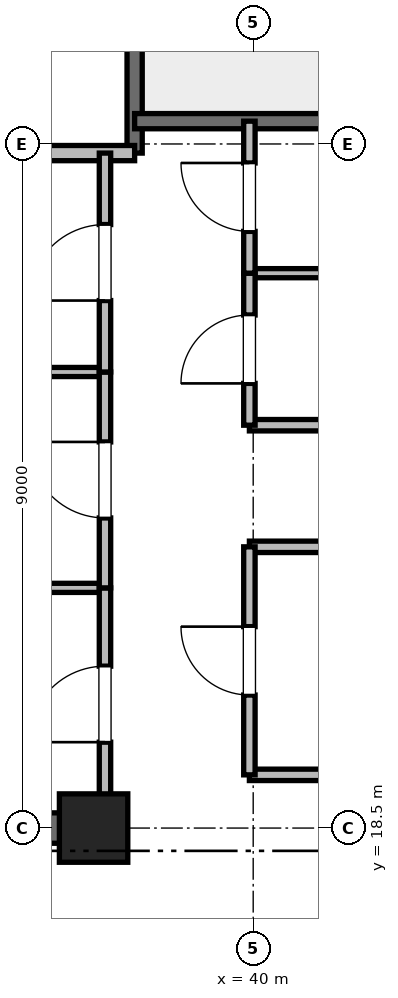
"""IFC4 building model, lengths in metres.
Left out: names, types, materials, properties, quantities, classifications, styles, units other than length and angle.
Written with IfcOpenShell. Run it as: python <this file> out.ifc"""

import sys

from ifc_helpers import new_model, si_unit, direction, frame, frame_2d, origin, origin_2d, place, context, subcontext, project, spatial, rectangle, extrude, element, fill, save


model = new_model("IFC4")
c1 = context("Model", 3, precision=1e-05, world=origin(), true_north=direction((0.0, 1.0)))
c2 = subcontext(c1, "Body", "Model", "MODEL_VIEW")
j1 = project(units=[si_unit("LENGTHUNIT", "METRE"), si_unit("PLANEANGLEUNIT", "RADIAN")], contexts=[c1])
p1 = place(None, origin())
s1 = spatial("IfcSite", under=j1, at=p1, CompositionType="ELEMENT")
p2 = place(p1, origin())
s2 = spatial("IfcBuilding", under=s1, at=p2, CompositionType="ELEMENT")
p3 = place(p2, frame((0.0, 0.0, 330.8)))
s3 = spatial("IfcBuildingStorey", under=s2, at=p3, CompositionType="ELEMENT", Elevation=330.8)
p4 = place(p3, frame((37.9, 18.5, 0.0), z_axis=(0.0, 0.0, 1.0), x_axis=(1.0, 0.0, 0.0)))
e1 = element("IfcColumn", 1, at=p4, inside=s3, PredefinedType="PILASTER", context=c2, shape_type="SweptSolid", body=[
    extrude(rectangle(XDim=0.9, YDim=0.9, at=origin_2d()), origin(), (0.0, 0.0, 1.0), 4.0),
])
p5 = place(p3, frame((29.0, 18.5, 0.0), z_axis=(0.0, 0.0, 1.0), x_axis=(1.0, 0.0, 0.0)))
e2 = element("IfcWall", 2, at=p5, inside=s3, PredefinedType="SHEAR", context=c2, shape_type="SweptSolid", body=[
    extrude(rectangle(XDim=9.2, YDim=0.4, at=frame_2d((4.6, 0.0))), origin(), (0.0, 0.0, 1.0), 3.785),
])
p6 = place(p3, frame((38.44, 27.38, 0.0), z_axis=(0.0, 0.0, 1.0), x_axis=(0.0, 1.0, 0.0)))
e3 = element("IfcWall", 3, at=p6, inside=s3, PredefinedType="SOLIDWALL", context=c2, shape_type="SweptSolid", body=[
    extrude(rectangle(XDim=8.87, YDim=0.2, at=frame_2d((4.435, 0.0))), origin(), (0.0, 0.0, 1.0), 3.785),
])
p7 = place(p3, frame((38.44, 27.8, 0.0), z_axis=(0.0, 0.0, 1.0), x_axis=(1.0, 0.0, 0.0)))
e4 = element("IfcWall", 4, at=p7, inside=s3, PredefinedType="SOLIDWALL", context=c2, shape_type="SweptSolid", body=[
    extrude(rectangle(XDim=3.32, YDim=0.2, at=frame_2d((1.66, 0.0))), origin(), (0.0, 0.0, 1.0), 3.785),
])
p8 = place(p3, frame((32.82, 27.38, 0.0), z_axis=(0.0, 0.0, 1.0), x_axis=(1.0, 0.0, 0.0)))
e5 = element("IfcWall", 5, at=p8, inside=s3, PredefinedType="PARTITIONING", context=c2, shape_type="SweptSolid", body=[
    extrude(rectangle(XDim=5.62, YDim=0.2, at=frame_2d((2.81, 0.0))), origin(), (0.0, 0.0, 1.0), 3.785),
])
for number, where, z_axis, x_axis in (
    (6, (39.95, 19.2, 0.0), (0.0, 0.0, 1.0), (1.0, 0.0, 0.0)),
    (7, (39.95, 22.2, 0.0), (0.0, 0.0, 1.0), (1.0, 0.0, 0.0)),
    (8, (39.95, 23.8, 0.0), (0.0, 0.0, 1.0), (1.0, 0.0, 0.0)),
):
    element("IfcWall", number, at=place(p3, frame(where, z_axis=z_axis, x_axis=x_axis)), inside=s3, PredefinedType="PARTITIONING", context=c2, shape_type="SweptSolid", body=[
        extrude(rectangle(XDim=1.81, YDim=0.15, at=frame_2d((0.905, 0.0))), origin(), (0.0, 0.0, 1.0), 2.85),
    ])
p9 = place(p3, frame((39.95, 25.8, 0.0), z_axis=(0.0, 0.0, 1.0), x_axis=(1.0, 0.0, 0.0)))
e9 = element("IfcWall", 9, at=p9, inside=s3, PredefinedType="PARTITIONING", context=c2, shape_type="SweptSolid", body=[
    extrude(rectangle(XDim=1.81, YDim=0.12, at=frame_2d((0.905, 0.0))), origin(), (0.0, 0.0, 1.0), 2.85),
])
p10 = place(p3, frame((39.95, 19.2, 0.0), z_axis=(0.0, 0.0, 1.0), x_axis=(0.0, 1.0, 0.0)))
e10 = element("IfcWall", 10, at=p10, inside=s3, PredefinedType="PARTITIONING", context=c2, shape_type="SweptSolid", body=[
    extrude(rectangle(XDim=3.0, YDim=0.15, at=frame_2d((1.5, 0.0))), origin(), (0.0, 0.0, 1.0), 2.85),
])
p11 = place(p10, frame((1.05, 0.0, 0.0)))
e11 = element("IfcOpeningElement", 11, at=p11, cuts=e10, PredefinedType="OPENING", context=c2, shape_type="SweptSolid", body=[
    extrude(rectangle(XDim=0.9, YDim=2.1, at=frame_2d((0.45, 1.05))), frame((0.0, 0.075, 0.0), z_axis=(0.0, -1.0, 0.0), x_axis=(1.0, 0.0, 0.0)), (0.0, 0.0, 1.0), 0.15),
])
p12 = place(p3, frame((39.95, 23.8, 0.0), z_axis=(0.0, 0.0, 1.0), x_axis=(0.0, 1.0, 0.0)))
e12 = element("IfcWall", 12, at=p12, inside=s3, PredefinedType="PARTITIONING", context=c2, shape_type="SweptSolid", body=[
    extrude(rectangle(XDim=2.0, YDim=0.15, at=frame_2d((1.0, 0.0))), origin(), (0.0, 0.0, 1.0), 2.85),
])
p13 = place(p12, frame((0.55, 0.0, 0.0)))
e13 = element("IfcOpeningElement", 13, at=p13, cuts=e12, PredefinedType="OPENING", context=c2, shape_type="SweptSolid", body=[
    extrude(rectangle(XDim=0.9, YDim=2.1, at=frame_2d((0.45, 1.05))), frame((0.0, 0.075, 0.0), z_axis=(0.0, -1.0, 0.0), x_axis=(1.0, 0.0, 0.0)), (0.0, 0.0, 1.0), 0.15),
])
p14 = place(p3, frame((39.95, 25.8, 0.0), z_axis=(0.0, 0.0, 1.0), x_axis=(0.0, 1.0, 0.0)))
e14 = element("IfcWall", 14, at=p14, inside=s3, PredefinedType="PARTITIONING", context=c2, shape_type="SweptSolid", body=[
    extrude(rectangle(XDim=2.0, YDim=0.15, at=frame_2d((1.0, 0.0))), origin(), (0.0, 0.0, 1.0), 2.85),
])
p15 = place(p14, frame((0.55, 0.0, 0.0)))
e15 = element("IfcOpeningElement", 15, at=p15, cuts=e14, PredefinedType="OPENING", context=c2, shape_type="SweptSolid", body=[
    extrude(rectangle(XDim=0.9, YDim=2.1, at=frame_2d((0.45, 1.05))), frame((0.0, 0.075, 0.0), z_axis=(0.0, -1.0, 0.0), x_axis=(1.0, 0.0, 0.0)), (0.0, 0.0, 1.0), 0.15),
])
for number, where, z_axis, x_axis in (
    (16, (32.82, 21.66, 0.0), (0.0, 0.0, 1.0), (1.0, 0.0, 0.0)),
    (17, (32.82, 24.5, 0.0), (0.0, 0.0, 1.0), (1.0, 0.0, 0.0)),
):
    element("IfcWall", number, at=place(p3, frame(where, z_axis=z_axis, x_axis=x_axis)), inside=s3, PredefinedType="PARTITIONING", context=c2, shape_type="SweptSolid", body=[
        extrude(rectangle(XDim=5.23, YDim=0.12, at=frame_2d((2.615, 0.0))), origin(), (0.0, 0.0, 1.0), 2.85),
    ])
p16 = place(p3, frame((38.05, 18.6, 0.0), z_axis=(0.0, 0.0, 1.0), x_axis=(0.0, 1.0, 0.0)))
e18 = element("IfcWall", 18, at=p16, inside=s3, PredefinedType="PARTITIONING", context=c2, shape_type="SweptSolid", body=[
    extrude(rectangle(XDim=3.06, YDim=0.15, at=frame_2d((1.53, 0.0))), origin(), (0.0, 0.0, 1.0), 2.85),
])
p17 = place(p16, frame((1.03, 0.0, 0.0)))
e19 = element("IfcOpeningElement", 19, at=p17, cuts=e18, PredefinedType="OPENING", context=c2, shape_type="SweptSolid", body=[
    extrude(rectangle(XDim=1.0, YDim=2.15, at=frame_2d((0.5, 1.075))), frame((0.0, 0.075, 0.0), z_axis=(0.0, -1.0, 0.0), x_axis=(1.0, 0.0, 0.0)), (0.0, 0.0, 1.0), 0.15),
])
p18 = place(p3, frame((38.05, 21.66, 0.0), z_axis=(0.0, 0.0, 1.0), x_axis=(0.0, 1.0, 0.0)))
e20 = element("IfcWall", 20, at=p18, inside=s3, PredefinedType="PARTITIONING", context=c2, shape_type="SweptSolid", body=[
    extrude(rectangle(XDim=2.84, YDim=0.15, at=frame_2d((1.42, 0.0))), origin(), (0.0, 0.0, 1.0), 2.85),
])
p19 = place(p18, frame((0.92, 0.0, 0.0)))
e21 = element("IfcOpeningElement", 21, at=p19, cuts=e20, PredefinedType="OPENING", context=c2, shape_type="SweptSolid", body=[
    extrude(rectangle(XDim=1.0, YDim=2.15, at=frame_2d((0.5, 1.075))), frame((0.0, 0.075, 0.0), z_axis=(0.0, -1.0, 0.0), x_axis=(1.0, 0.0, 0.0)), (0.0, 0.0, 1.0), 0.15),
])
p20 = place(p3, frame((38.05, 24.5, 0.0), z_axis=(0.0, 0.0, 1.0), x_axis=(0.0, 1.0, 0.0)))
e22 = element("IfcWall", 22, at=p20, inside=s3, PredefinedType="PARTITIONING", context=c2, shape_type="SweptSolid", body=[
    extrude(rectangle(XDim=2.88, YDim=0.15, at=frame_2d((1.44, 0.0))), origin(), (0.0, 0.0, 1.0), 2.85),
])
p21 = place(p20, frame((0.94, 0.0, 0.0)))
e23 = element("IfcOpeningElement", 23, at=p21, cuts=e22, PredefinedType="OPENING", context=c2, shape_type="SweptSolid", body=[
    extrude(rectangle(XDim=1.0, YDim=2.15, at=frame_2d((0.5, 1.075))), frame((0.0, 0.075, 0.0), z_axis=(0.0, -1.0, 0.0), x_axis=(1.0, 0.0, 0.0)), (0.0, 0.0, 1.0), 0.15),
])
p22 = place(p11, origin())
e24 = element("IfcDoor", 24, at=p22, inside=s3, OperationType="SINGLE_SWING_RIGHT", PredefinedType="DOOR", context=c2, shape_type="SweptSolid", body=[
    extrude(rectangle(XDim=0.9, YDim=2.1, at=frame_2d((0.45, 1.05))), frame((0.0, 0.025, 0.0), z_axis=(0.0, -1.0, 0.0), x_axis=(1.0, 0.0, 0.0)), (0.0, 0.0, 1.0), 0.05),
])
fill(e11, e24)
p23 = place(p13, origin())
e25 = element("IfcDoor", 25, at=p23, inside=s3, OperationType="SINGLE_SWING_LEFT", PredefinedType="DOOR", context=c2, shape_type="SweptSolid", body=[
    extrude(rectangle(XDim=0.9, YDim=2.1, at=frame_2d((0.45, 1.05))), frame((0.0, 0.025, 0.0), z_axis=(0.0, -1.0, 0.0), x_axis=(1.0, 0.0, 0.0)), (0.0, 0.0, 1.0), 0.05),
])
fill(e13, e25)
p24 = place(p15, origin())
e26 = element("IfcDoor", 26, at=p24, inside=s3, OperationType="SINGLE_SWING_RIGHT", PredefinedType="DOOR", context=c2, shape_type="SweptSolid", body=[
    extrude(rectangle(XDim=0.9, YDim=2.1, at=frame_2d((0.45, 1.05))), frame((0.0, 0.025, 0.0), z_axis=(0.0, -1.0, 0.0), x_axis=(1.0, 0.0, 0.0)), (0.0, 0.0, 1.0), 0.05),
])
fill(e15, e26)
p25 = place(p17, origin())
e27 = element("IfcDoor", 27, at=p25, inside=s3, OperationType="SINGLE_SWING_LEFT", PredefinedType="DOOR", context=c2, shape_type="SweptSolid", body=[
    extrude(rectangle(XDim=1.0, YDim=2.15, at=frame_2d((0.5, 1.075))), frame((0.0, 0.025, 0.0), z_axis=(0.0, -1.0, 0.0), x_axis=(1.0, 0.0, 0.0)), (0.0, 0.0, 1.0), 0.05),
])
fill(e19, e27)
p26 = place(p19, origin())
e28 = element("IfcDoor", 28, at=p26, inside=s3, OperationType="SINGLE_SWING_RIGHT", PredefinedType="DOOR", context=c2, shape_type="SweptSolid", body=[
    extrude(rectangle(XDim=1.0, YDim=2.15, at=frame_2d((0.5, 1.075))), frame((0.0, 0.025, 0.0), z_axis=(0.0, -1.0, 0.0), x_axis=(1.0, 0.0, 0.0)), (0.0, 0.0, 1.0), 0.05),
])
fill(e21, e28)
p27 = place(p21, origin())
e29 = element("IfcDoor", 29, at=p27, inside=s3, OperationType="SINGLE_SWING_LEFT", PredefinedType="DOOR", context=c2, shape_type="SweptSolid", body=[
    extrude(rectangle(XDim=1.0, YDim=2.15, at=frame_2d((0.5, 1.075))), frame((0.0, 0.025, 0.0), z_axis=(0.0, -1.0, 0.0), x_axis=(1.0, 0.0, 0.0)), (0.0, 0.0, 1.0), 0.05),
])
fill(e23, e29)
save(model, sys.argv[1])
